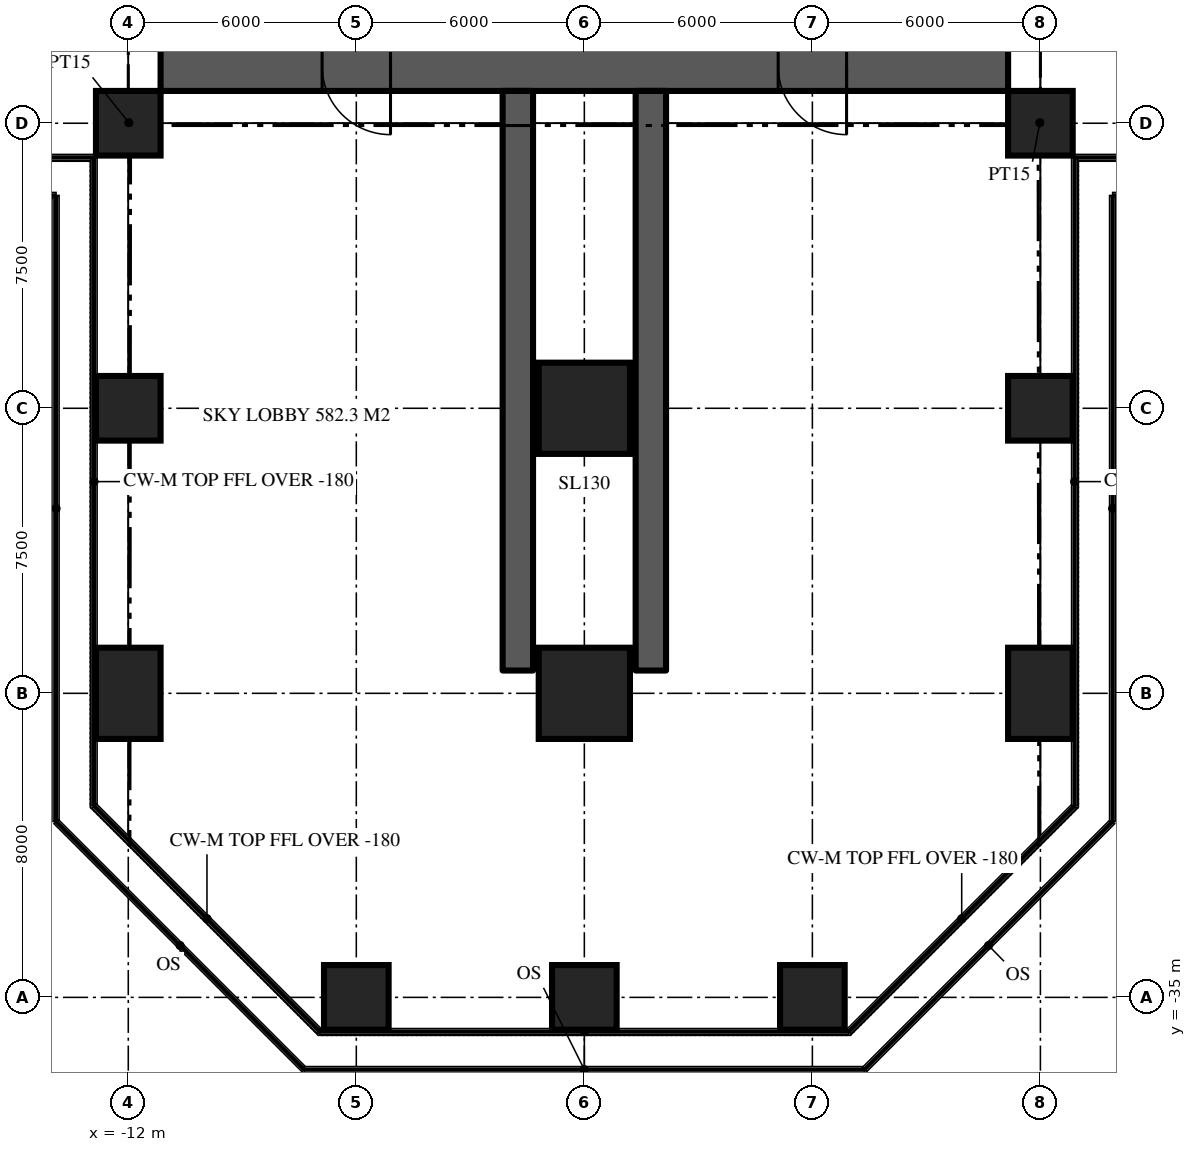
"""IFC4 building model, lengths in metres.
Left out: names, types, materials, properties, quantities, classifications, styles, units other than length and angle.
Written with IfcOpenShell. Run it as: python <this file> out.ifc"""

import sys

from ifc_helpers import new_model, si_unit, direction, frame, frame_2d, origin, origin_2d, place, context, subcontext, project, spatial, rectangle, extrude, element, fill, save


model = new_model("IFC4")
c1 = context("Model", 3, precision=1e-05, world=origin(), true_north=direction((0.0, 1.0)))
c2 = subcontext(c1, "Body", "Model", "MODEL_VIEW")
j1 = project(units=[si_unit("LENGTHUNIT", "METRE"), si_unit("PLANEANGLEUNIT", "RADIAN")], contexts=[c1])
p1 = place(None, origin())
s1 = spatial("IfcSite", under=j1, at=p1, CompositionType="ELEMENT")
p2 = place(p1, origin())
s2 = spatial("IfcBuilding", under=s1, at=p2, CompositionType="ELEMENT")
p3 = place(p2, frame((0.0, 0.0, 113.7)))
s3 = spatial("IfcBuildingStorey", under=s2, at=p3, CompositionType="ELEMENT", Elevation=113.7)
p4 = place(p3, frame((11.15, -10.5, 0.0), z_axis=(0.0, 0.0, 1.0), x_axis=(-1.0, 0.0, 0.0)))
e1 = element("IfcWall", 1, at=p4, inside=s3, PredefinedType="SHEAR", context=c2, shape_type="SweptSolid", body=[
    extrude(rectangle(XDim=22.3, YDim=1.3, at=frame_2d((11.15, 0.0))), origin(), (0.0, 0.0, 1.0), 4.5),
])
p5 = place(p4, frame((16.25, 0.0, 0.0)))
e2 = element("IfcOpeningElement", 2, at=p5, cuts=e1, PredefinedType="OPENING", context=c2, shape_type="SweptSolid", body=[
    extrude(rectangle(XDim=1.8, YDim=2.2, at=frame_2d((0.9, 1.1))), frame((0.0, 0.66, 0.0), z_axis=(0.0, -1.0, 0.0), x_axis=(1.0, 0.0, 0.0)), (0.0, 0.0, 1.0), 1.32),
])
p6 = place(p4, frame((4.25, 0.0, 0.0)))
e3 = element("IfcOpeningElement", 3, at=p6, cuts=e1, PredefinedType="OPENING", context=c2, shape_type="SweptSolid", body=[
    extrude(rectangle(XDim=1.8, YDim=2.2, at=frame_2d((0.9, 1.1))), frame((0.0, 0.66, 0.0), z_axis=(0.0, -1.0, 0.0), x_axis=(1.0, 0.0, 0.0)), (0.0, 0.0, 1.0), 1.32),
])
for number, where, z_axis, x_axis in (
    (4, (-1.75, -11.15, 0.0), (0.0, 0.0, 1.0), (0.0, -1.0, 0.0)),
    (5, (1.75, -11.15, 0.0), (0.0, 0.0, 1.0), (0.0, -1.0, 0.0)),
):
    element("IfcWall", number, at=place(p3, frame(where, z_axis=z_axis, x_axis=x_axis)), inside=s3, PredefinedType="SHEAR", context=c2, shape_type="SweptSolid", body=[
        extrude(rectangle(XDim=15.25, YDim=0.8, at=frame_2d((7.625, 0.0))), origin(), (0.0, 0.0, 1.0), 4.5),
    ])
for number, where, z_axis, x_axis in (
    (6, (-6.0, -35.0, 0.0), (0.0, 0.0, 1.0), (1.0, 0.0, 0.0)),
    (7, (0.0, -35.0, 0.0), (0.0, 0.0, 1.0), (1.0, 0.0, 0.0)),
    (8, (6.0, -35.0, 0.0), (0.0, 0.0, 1.0), (1.0, 0.0, 0.0)),
):
    element("IfcColumn", number, at=place(p3, frame(where, z_axis=z_axis, x_axis=x_axis)), inside=s3, PredefinedType="COLUMN", context=c2, shape_type="SweptSolid", body=[
        extrude(rectangle(XDim=1.7, YDim=1.7, at=origin_2d()), origin(), (0.0, 0.0, 1.0), 4.5),
    ])
p7 = place(p3, frame((-12.0, -27.0, 0.0), z_axis=(0.0, 0.0, 1.0), x_axis=(1.0, 0.0, 0.0)))
e9 = element("IfcColumn", 9, at=p7, inside=s3, PredefinedType="COLUMN", context=c2, shape_type="SweptSolid", body=[
    extrude(rectangle(XDim=1.7, YDim=2.4, at=origin_2d()), origin(), (0.0, 0.0, 1.0), 4.5),
])
p8 = place(p3, frame((0.0, -27.0, 0.0), z_axis=(0.0, 0.0, 1.0), x_axis=(1.0, 0.0, 0.0)))
e10 = element("IfcColumn", 10, at=p8, inside=s3, PredefinedType="COLUMN", context=c2, shape_type="SweptSolid", body=[
    extrude(rectangle(XDim=2.4, YDim=2.4, at=origin_2d()), origin(), (0.0, 0.0, 1.0), 4.5),
])
p9 = place(p3, frame((12.0, -27.0, 0.0), z_axis=(0.0, 0.0, 1.0), x_axis=(1.0, 0.0, 0.0)))
e11 = element("IfcColumn", 11, at=p9, inside=s3, PredefinedType="COLUMN", context=c2, shape_type="SweptSolid", body=[
    extrude(rectangle(XDim=1.7, YDim=2.4, at=origin_2d()), origin(), (0.0, 0.0, 1.0), 4.5),
])
p10 = place(p3, frame((-12.0, -19.5, 0.0), z_axis=(0.0, 0.0, 1.0), x_axis=(1.0, 0.0, 0.0)))
e12 = element("IfcColumn", 12, at=p10, inside=s3, PredefinedType="COLUMN", context=c2, shape_type="SweptSolid", body=[
    extrude(rectangle(XDim=1.7, YDim=1.7, at=origin_2d()), origin(), (0.0, 0.0, 1.0), 4.5),
])
p11 = place(p3, frame((0.0, -19.5, 0.0), z_axis=(0.0, 0.0, 1.0), x_axis=(1.0, 0.0, 0.0)))
e13 = element("IfcColumn", 13, at=p11, inside=s3, PredefinedType="COLUMN", context=c2, shape_type="SweptSolid", body=[
    extrude(rectangle(XDim=2.4, YDim=2.4, at=origin_2d()), origin(), (0.0, 0.0, 1.0), 4.5),
])
for number, where, z_axis, x_axis in (
    (14, (12.0, -19.5, 0.0), (0.0, 0.0, 1.0), (1.0, 0.0, 0.0)),
    (15, (-12.0, -12.0, 0.0), (0.0, 0.0, 1.0), (1.0, 0.0, 0.0)),
    (16, (12.0, -12.0, 0.0), (0.0, 0.0, 1.0), (1.0, 0.0, 0.0)),
):
    element("IfcColumn", number, at=place(p3, frame(where, z_axis=z_axis, x_axis=x_axis)), inside=s3, PredefinedType="COLUMN", context=c2, shape_type="SweptSolid", body=[
        extrude(rectangle(XDim=1.7, YDim=1.7, at=origin_2d()), origin(), (0.0, 0.0, 1.0), 4.5),
    ])
for number, where, z_axis, x_axis in (
    (17, (-11.15, -11.15, 0.0), (0.0, 0.0, 1.0), (-0.707, -0.707, 0.0)),
    (18, (11.15, -11.15, 0.0), (0.0, 0.0, 1.0), (0.707, -0.707, 0.0)),
):
    element("IfcWall", number, at=place(p3, frame(where, z_axis=z_axis, x_axis=x_axis)), inside=s3, PredefinedType="PARTITIONING", context=c2, shape_type="SweptSolid", body=[
        extrude(rectangle(XDim=2.362, YDim=0.15, at=frame_2d((1.181, 0.0))), origin(), (0.0, 0.0, 1.0), 4.32),
    ])
p12 = place(p5, origin())
e19 = element("IfcDoor", 19, at=p12, inside=s3, OperationType="DOUBLE_DOOR_DOUBLE_SWING", PredefinedType="DOOR", context=c2, shape_type="SweptSolid", body=[
    extrude(rectangle(XDim=1.8, YDim=2.2, at=frame_2d((0.9, 1.1))), frame((0.0, 0.025, 0.0), z_axis=(0.0, -1.0, 0.0), x_axis=(1.0, 0.0, 0.0)), (0.0, 0.0, 1.0), 0.05),
])
fill(e2, e19)
p13 = place(p6, origin())
e20 = element("IfcDoor", 20, at=p13, inside=s3, OperationType="DOUBLE_DOOR_DOUBLE_SWING", PredefinedType="DOOR", context=c2, shape_type="SweptSolid", body=[
    extrude(rectangle(XDim=1.8, YDim=2.2, at=frame_2d((0.9, 1.1))), frame((0.0, 0.025, 0.0), z_axis=(0.0, -1.0, 0.0), x_axis=(1.0, 0.0, 0.0)), (0.0, 0.0, 1.0), 0.05),
])
fill(e3, e20)
save(model, sys.argv[1])
